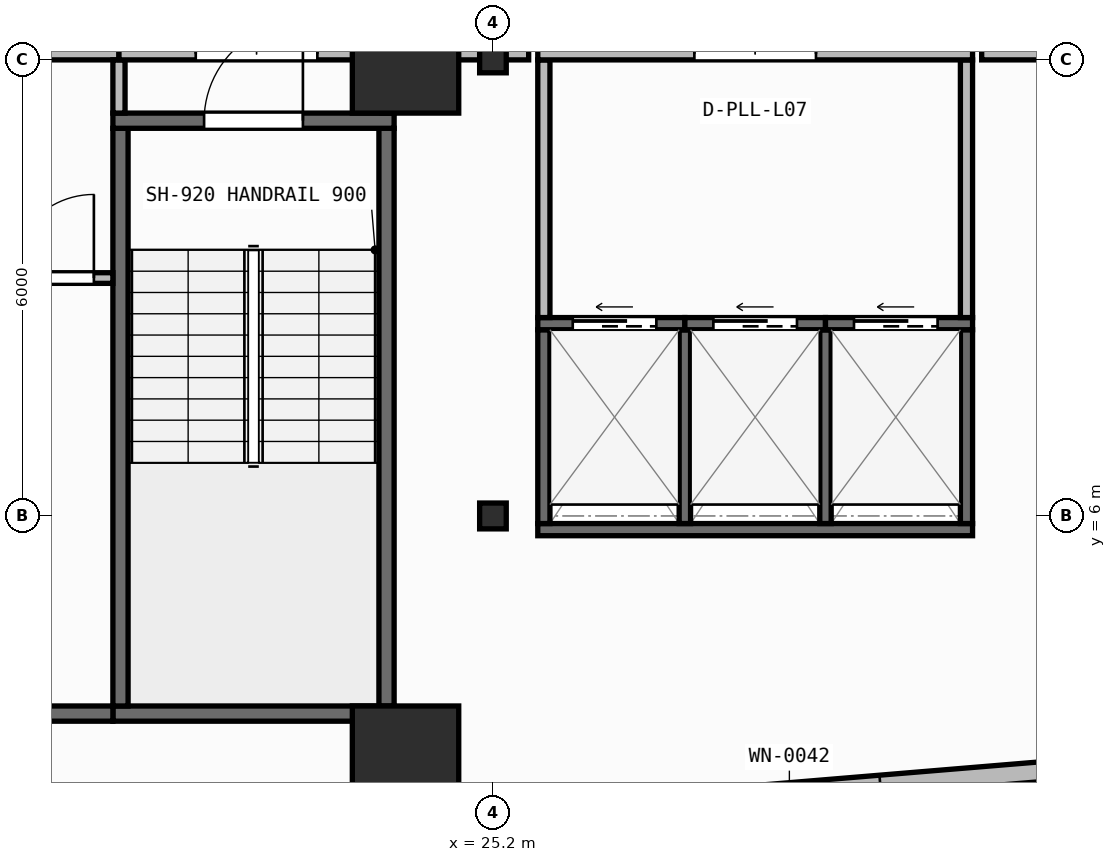
"""IFC4 building model, lengths in metres.
Left out: names, types, materials, properties, quantities, classifications, styles, units other than length and angle.
Written with IfcOpenShell. Run it as: python <this file> out.ifc"""

import sys

from ifc_helpers import new_model, si_unit, direction, frame, frame_2d, origin, origin_2d, place, context, subcontext, project, spatial, rectangle, i_section, extrude, element, fill, save


model = new_model("IFC4")
c1 = context("Model", 3, precision=1e-05, world=origin(), true_north=direction((0.0, 1.0)))
c2 = subcontext(c1, "Body", "Model", "MODEL_VIEW")
j1 = project(units=[si_unit("LENGTHUNIT", "METRE"), si_unit("PLANEANGLEUNIT", "RADIAN")], contexts=[c1])
p1 = place(None, origin())
s1 = spatial("IfcSite", under=j1, at=p1, CompositionType="ELEMENT")
p2 = place(p1, origin())
s2 = spatial("IfcBuilding", under=s1, at=p2, CompositionType="ELEMENT")
p3 = place(p2, frame((0.0, 0.0, 30.4)))
s3 = spatial("IfcBuildingStorey", under=s2, at=p3, CompositionType="ELEMENT", Elevation=30.4)
p4 = place(p3, frame((24.05, 2.8, 0.0), z_axis=(0.0, 0.0, 1.0), x_axis=(1.0, 0.0, 0.0)))
e1 = element("IfcColumn", 1, at=p4, inside=s3, PredefinedType="COLUMN", context=c2, shape_type="SweptSolid", body=[
    extrude(rectangle(XDim=1.4, YDim=1.4, at=origin_2d()), origin(), (0.0, 0.0, 1.0), 3.95),
])
p5 = place(p3, frame((25.2, 6.0, 0.0), z_axis=(0.0, 0.0, 1.0), x_axis=(1.0, 0.0, 0.0)))
e2 = element("IfcColumn", 2, at=p5, inside=s3, PredefinedType="COLUMN", context=c2, shape_type="SweptSolid", body=[
    extrude(i_section(OverallWidth=0.35, OverallDepth=0.34, WebThickness=0.016, FlangeThickness=0.028, at=origin_2d()), origin(), (0.0, 0.0, 1.0), 3.95),
])
p6 = place(p3, frame((24.05, 12.0, 0.0), z_axis=(0.0, 0.0, 1.0), x_axis=(1.0, 0.0, 0.0)))
e3 = element("IfcColumn", 3, at=p6, inside=s3, PredefinedType="COLUMN", context=c2, shape_type="SweptSolid", body=[
    extrude(rectangle(XDim=1.4, YDim=1.4, at=origin_2d()), origin(), (0.0, 0.0, 1.0), 3.95),
])
p7 = place(p3, frame((25.2, 12.0, 0.0), z_axis=(0.0, 0.0, 1.0), x_axis=(1.0, 0.0, 0.0)))
e4 = element("IfcColumn", 4, at=p7, inside=s3, PredefinedType="COLUMN", context=c2, shape_type="SweptSolid", body=[
    extrude(i_section(OverallWidth=0.35, OverallDepth=0.34, WebThickness=0.016, FlangeThickness=0.028, at=origin_2d()), origin(), (0.0, 0.0, 1.0), 3.95),
])
p8 = place(p3, frame((2.76, 0.174, 0.0), z_axis=(0.0, 0.0, 1.0), x_axis=(0.996571478456, 0.082736257641, 0.0)))
e5 = element("IfcWall", 5, at=p8, inside=s3, PredefinedType="STANDARD", context=c2, shape_type="SweptSolid", body=[
    extrude(rectangle(XDim=52.861, YDim=0.26, at=frame_2d((26.431, 0.0))), origin(), (0.0, 0.0, 1.0), 3.71),
])
p9 = place(p8, frame((25.231, 0.0, 0.9)))
e6 = element("IfcOpeningElement", 6, at=p9, cuts=e5, PredefinedType="OPENING", context=c2, shape_type="SweptSolid", body=[
    extrude(rectangle(XDim=2.4, YDim=1.65, at=frame_2d((1.2, 0.825))), frame((0.0, 0.14, 0.0), z_axis=(0.0, -1.0, 0.0), x_axis=(1.0, 0.0, 0.0)), (0.0, 0.0, 1.0), 0.28),
])
p10 = place(p3, frame((20.2, 3.4, 0.0), z_axis=(0.0, 0.0, 1.0), x_axis=(1.0, 0.0, 0.0)))
e7 = element("IfcWall", 7, at=p10, inside=s3, PredefinedType="SHEAR", context=c2, shape_type="SweptSolid", body=[
    extrude(rectangle(XDim=3.7, YDim=0.2, at=frame_2d((1.85, 0.0))), origin(), (0.0, 0.0, 1.0), 3.71),
])
for number, where, z_axis, x_axis in (
    (8, (20.3, 3.5, 0.0), (0.0, 0.0, 1.0), (0.0, 1.0, 0.0)),
    (9, (23.8, 3.5, 0.0), (0.0, 0.0, 1.0), (0.0, 1.0, 0.0)),
):
    element("IfcWall", number, at=place(p3, frame(where, z_axis=z_axis, x_axis=x_axis)), inside=s3, PredefinedType="SHEAR", context=c2, shape_type="SweptSolid", body=[
        extrude(rectangle(XDim=7.6, YDim=0.2, at=frame_2d((3.8, 0.0))), origin(), (0.0, 0.0, 1.0), 3.71),
    ])
p11 = place(p3, frame((20.2, 11.2, 0.0), z_axis=(0.0, 0.0, 1.0), x_axis=(1.0, 0.0, 0.0)))
e10 = element("IfcWall", 10, at=p11, inside=s3, PredefinedType="SHEAR", context=c2, shape_type="SweptSolid", body=[
    extrude(rectangle(XDim=3.7, YDim=0.2, at=frame_2d((1.85, 0.0))), origin(), (0.0, 0.0, 1.0), 3.71),
])
p12 = place(p11, frame((1.2, 0.0, 0.0)))
e11 = element("IfcOpeningElement", 11, at=p12, cuts=e10, PredefinedType="OPENING", context=c2, shape_type="SweptSolid", body=[
    extrude(rectangle(XDim=1.3, YDim=2.15, at=frame_2d((0.65, 1.075))), frame((0.0, 0.11, 0.0), z_axis=(0.0, -1.0, 0.0), x_axis=(1.0, 0.0, 0.0)), (0.0, 0.0, 1.0), 0.22),
])
p13 = place(p3, frame((6.5, 3.4, 0.0), z_axis=(0.0, 0.0, 1.0), x_axis=(1.0, 0.0, 0.0)))
e12 = element("IfcWall", 12, at=p13, inside=s3, PredefinedType="SHEAR", context=c2, shape_type="SweptSolid", body=[
    extrude(rectangle(XDim=13.7, YDim=0.2, at=frame_2d((6.85, 0.0))), origin(), (0.0, 0.0, 1.0), 3.71),
])
p14 = place(p3, frame((25.79, 5.82, 0.0), z_axis=(0.0, 0.0, 1.0), x_axis=(1.0, 0.0, 0.0)))
e13 = element("IfcWall", 13, at=p14, inside=s3, PredefinedType="SHEAR", context=c2, shape_type="SweptSolid", body=[
    extrude(rectangle(XDim=5.72, YDim=0.16, at=frame_2d((2.86, 0.0))), origin(), (0.0, 0.0, 1.0), 3.71),
])
for number, where, z_axis, x_axis in (
    (14, (25.87, 5.9, 0.0), (0.0, 0.0, 1.0), (0.0, 1.0, 0.0)),
    (15, (31.43, 5.9, 0.0), (0.0, 0.0, 1.0), (0.0, 1.0, 0.0)),
):
    element("IfcWall", number, at=place(p3, frame(where, z_axis=z_axis, x_axis=x_axis)), inside=s3, PredefinedType="SHEAR", context=c2, shape_type="SweptSolid", body=[
        extrude(rectangle(XDim=2.55, YDim=0.16, at=frame_2d((1.275, 0.0))), origin(), (0.0, 0.0, 1.0), 3.71),
    ])
for number, where, z_axis, x_axis in (
    (16, (27.725, 5.9, 0.0), (0.0, 0.0, 1.0), (0.0, 1.0, 0.0)),
    (17, (29.575, 5.9, 0.0), (0.0, 0.0, 1.0), (0.0, 1.0, 0.0)),
):
    element("IfcWall", number, at=place(p3, frame(where, z_axis=z_axis, x_axis=x_axis)), inside=s3, PredefinedType="SHEAR", context=c2, shape_type="SweptSolid", body=[
        extrude(rectangle(XDim=2.55, YDim=0.15, at=frame_2d((1.275, 0.0))), origin(), (0.0, 0.0, 1.0), 3.71),
    ])
p15 = place(p3, frame((25.79, 8.53, 0.0), z_axis=(0.0, 0.0, 1.0), x_axis=(1.0, 0.0, 0.0)))
e18 = element("IfcWall", 18, at=p15, inside=s3, PredefinedType="SHEAR", context=c2, shape_type="SweptSolid", body=[
    extrude(rectangle(XDim=1.935, YDim=0.16, at=frame_2d((0.968, 0.0))), origin(), (0.0, 0.0, 1.0), 3.71),
])
p16 = place(p15, frame((0.46, 0.0, 0.0)))
e19 = element("IfcOpeningElement", 19, at=p16, cuts=e18, PredefinedType="OPENING", context=c2, shape_type="SweptSolid", body=[
    extrude(rectangle(XDim=1.1, YDim=2.15, at=frame_2d((0.55, 1.075))), frame((0.0, 0.09, 0.0), z_axis=(0.0, -1.0, 0.0), x_axis=(1.0, 0.0, 0.0)), (0.0, 0.0, 1.0), 0.18),
])
p17 = place(p3, frame((27.725, 8.53, 0.0), z_axis=(0.0, 0.0, 1.0), x_axis=(1.0, 0.0, 0.0)))
e20 = element("IfcWall", 20, at=p17, inside=s3, PredefinedType="SHEAR", context=c2, shape_type="SweptSolid", body=[
    extrude(rectangle(XDim=1.85, YDim=0.16, at=frame_2d((0.925, 0.0))), origin(), (0.0, 0.0, 1.0), 3.71),
])
p18 = place(p17, frame((0.375, 0.0, 0.0)))
e21 = element("IfcOpeningElement", 21, at=p18, cuts=e20, PredefinedType="OPENING", context=c2, shape_type="SweptSolid", body=[
    extrude(rectangle(XDim=1.1, YDim=2.15, at=frame_2d((0.55, 1.075))), frame((0.0, 0.09, 0.0), z_axis=(0.0, -1.0, 0.0), x_axis=(1.0, 0.0, 0.0)), (0.0, 0.0, 1.0), 0.18),
])
p19 = place(p3, frame((29.575, 8.53, 0.0), z_axis=(0.0, 0.0, 1.0), x_axis=(1.0, 0.0, 0.0)))
e22 = element("IfcWall", 22, at=p19, inside=s3, PredefinedType="SHEAR", context=c2, shape_type="SweptSolid", body=[
    extrude(rectangle(XDim=1.935, YDim=0.16, at=frame_2d((0.968, 0.0))), origin(), (0.0, 0.0, 1.0), 3.71),
])
p20 = place(p19, frame((0.375, 0.0, 0.0)))
e23 = element("IfcOpeningElement", 23, at=p20, cuts=e22, PredefinedType="OPENING", context=c2, shape_type="SweptSolid", body=[
    extrude(rectangle(XDim=1.1, YDim=2.15, at=frame_2d((0.55, 1.075))), frame((0.0, 0.09, 0.0), z_axis=(0.0, -1.0, 0.0), x_axis=(1.0, 0.0, 0.0)), (0.0, 0.0, 1.0), 0.18),
])
p21 = place(p3, frame((18.61, 9.13, 0.0), z_axis=(0.0, 0.0, 1.0), x_axis=(1.0, 0.0, 0.0)))
e24 = element("IfcWall", 24, at=p21, inside=s3, PredefinedType="PARTITIONING", context=c2, shape_type="SweptSolid", body=[
    extrude(rectangle(XDim=1.59, YDim=0.14, at=frame_2d((0.795, 0.0))), origin(), (0.0, 0.0, 1.0), 3.71),
])
p22 = place(p21, frame((0.24, 0.0, 0.0)))
e25 = element("IfcOpeningElement", 25, at=p22, cuts=e24, PredefinedType="OPENING", context=c2, shape_type="SweptSolid", body=[
    extrude(rectangle(XDim=1.1, YDim=2.1, at=frame_2d((0.55, 1.05))), frame((0.0, 0.08, 0.0), z_axis=(0.0, -1.0, 0.0), x_axis=(1.0, 0.0, 0.0)), (0.0, 0.0, 1.0), 0.16),
])
p23 = place(p3, frame((12.58, 12.08, 0.0), z_axis=(0.0, 0.0, 1.0), x_axis=(1.0, 0.0, 0.0)))
e26 = element("IfcWall", 26, at=p23, inside=s3, PredefinedType="PARTITIONING", context=c2, shape_type="SweptSolid", body=[
    extrude(rectangle(XDim=7.7, YDim=0.16, at=frame_2d((3.85, 0.0))), origin(), (0.0, 0.0, 1.0), 3.073),
])
p24 = place(p23, frame((3.05, 0.0, 0.0)))
e27 = element("IfcOpeningElement", 27, at=p24, cuts=e26, PredefinedType="OPENING", context=c2, shape_type="SweptSolid", body=[
    extrude(rectangle(XDim=1.6, YDim=2.05, at=frame_2d((0.8, 1.025))), frame((0.0, 0.09, 0.0), z_axis=(0.0, -1.0, 0.0), x_axis=(1.0, 0.0, 0.0)), (0.0, 0.0, 1.0), 0.18),
])
p25 = place(p3, frame((20.28, 11.3, 0.0), z_axis=(0.0, 0.0, 1.0), x_axis=(0.0, 1.0, 0.0)))
e28 = element("IfcWall", 28, at=p25, inside=s3, PredefinedType="PARTITIONING", context=c2, shape_type="SweptSolid", body=[
    extrude(rectangle(XDim=0.7, YDim=0.16, at=frame_2d((0.35, 0.0))), origin(), (0.0, 0.0, 1.0), 3.71),
])
p26 = place(p3, frame((20.28, 12.08, 0.0), z_axis=(0.0, 0.0, 1.0), x_axis=(1.0, 0.0, 0.0)))
e29 = element("IfcWall", 29, at=p26, inside=s3, PredefinedType="PARTITIONING", context=c2, shape_type="SweptSolid", body=[
    extrude(rectangle(XDim=3.62, YDim=0.16, at=frame_2d((1.81, 0.0))), origin(), (0.0, 0.0, 1.0), 3.073),
])
p27 = place(p26, frame((1.01, 0.0, 0.0)))
e30 = element("IfcOpeningElement", 30, at=p27, cuts=e29, PredefinedType="OPENING", context=c2, shape_type="SweptSolid", body=[
    extrude(rectangle(XDim=1.6, YDim=2.05, at=frame_2d((0.8, 1.025))), frame((0.0, 0.09, 0.0), z_axis=(0.0, -1.0, 0.0), x_axis=(1.0, 0.0, 0.0)), (0.0, 0.0, 1.0), 0.18),
])
p28 = place(p3, frame((23.82, 11.3, 0.0), z_axis=(0.0, 0.0, 1.0), x_axis=(0.0, 1.0, 0.0)))
e31 = element("IfcWall", 31, at=p28, inside=s3, PredefinedType="PARTITIONING", context=c2, shape_type="SweptSolid", body=[
    extrude(rectangle(XDim=0.7, YDim=0.16, at=frame_2d((0.35, 0.0))), origin(), (0.0, 0.0, 1.0), 3.71),
])
for number, where, z_axis, x_axis in (
    (32, (25.87, 8.61, 0.0), (0.0, 0.0, 1.0), (0.0, 1.0, 0.0)),
    (33, (31.43, 8.61, 0.0), (0.0, 0.0, 1.0), (0.0, 1.0, 0.0)),
):
    element("IfcWall", number, at=place(p3, frame(where, z_axis=z_axis, x_axis=x_axis)), inside=s3, PredefinedType="PARTITIONING", context=c2, shape_type="SweptSolid", body=[
        extrude(rectangle(XDim=3.39, YDim=0.16, at=frame_2d((1.695, 0.0))), origin(), (0.0, 0.0, 1.0), 3.71),
    ])
p29 = place(p3, frame((25.79, 12.08, 0.0), z_axis=(0.0, 0.0, 1.0), x_axis=(1.0, 0.0, 0.0)))
e34 = element("IfcWall", 34, at=p29, inside=s3, PredefinedType="PARTITIONING", context=c2, shape_type="SweptSolid", body=[
    extrude(rectangle(XDim=5.72, YDim=0.16, at=frame_2d((2.86, 0.0))), origin(), (0.0, 0.0, 1.0), 3.073),
])
p30 = place(p29, frame((2.06, 0.0, 0.0)))
e35 = element("IfcOpeningElement", 35, at=p30, cuts=e34, PredefinedType="OPENING", context=c2, shape_type="SweptSolid", body=[
    extrude(rectangle(XDim=1.6, YDim=2.05, at=frame_2d((0.8, 1.025))), frame((0.0, 0.09, 0.0), z_axis=(0.0, -1.0, 0.0), x_axis=(1.0, 0.0, 0.0)), (0.0, 0.0, 1.0), 0.18),
])
p31 = place(p3, frame((24.02, 12.08, 0.0), z_axis=(0.0, 0.0, 1.0), x_axis=(1.0, 0.0, 0.0)))
e36 = element("IfcWall", 36, at=p31, inside=s3, PredefinedType="PARTITIONING", context=c2, shape_type="SweptSolid", body=[
    extrude(rectangle(XDim=1.65, YDim=0.16, at=frame_2d((0.825, 0.0))), origin(), (0.0, 0.0, 1.0), 3.073),
])
p32 = place(p3, frame((31.63, 12.08, 0.0), z_axis=(0.0, 0.0, 1.0), x_axis=(1.0, 0.0, 0.0)))
e37 = element("IfcWall", 37, at=p32, inside=s3, PredefinedType="PARTITIONING", context=c2, shape_type="SweptSolid", body=[
    extrude(rectangle(XDim=11.181, YDim=0.16, at=frame_2d((5.59, 0.0))), origin(), (0.0, 0.0, 1.0), 3.073),
])
p33 = place(p12, origin())
e38 = element("IfcDoor", 38, at=p33, inside=s3, OperationType="SINGLE_SWING_RIGHT", PredefinedType="DOOR", context=c2, shape_type="SweptSolid", body=[
    extrude(rectangle(XDim=1.3, YDim=2.15, at=frame_2d((0.65, 1.075))), frame((0.0, 0.025, 0.0), z_axis=(0.0, -1.0, 0.0), x_axis=(1.0, 0.0, 0.0)), (0.0, 0.0, 1.0), 0.05),
])
fill(e11, e38)
p34 = place(p16, origin())
e39 = element("IfcDoor", 39, at=p34, inside=s3, OperationType="SLIDING_TO_LEFT", PredefinedType="DOOR", context=c2, shape_type="SweptSolid", body=[
    extrude(rectangle(XDim=1.1, YDim=2.15, at=frame_2d((0.55, 1.075))), frame((0.0, 0.025, 0.0), z_axis=(0.0, -1.0, 0.0), x_axis=(1.0, 0.0, 0.0)), (0.0, 0.0, 1.0), 0.05),
])
fill(e19, e39)
p35 = place(p18, origin())
e40 = element("IfcDoor", 40, at=p35, inside=s3, OperationType="SLIDING_TO_LEFT", PredefinedType="DOOR", context=c2, shape_type="SweptSolid", body=[
    extrude(rectangle(XDim=1.1, YDim=2.15, at=frame_2d((0.55, 1.075))), frame((0.0, 0.025, 0.0), z_axis=(0.0, -1.0, 0.0), x_axis=(1.0, 0.0, 0.0)), (0.0, 0.0, 1.0), 0.05),
])
fill(e21, e40)
p36 = place(p20, origin())
e41 = element("IfcDoor", 41, at=p36, inside=s3, OperationType="SLIDING_TO_LEFT", PredefinedType="DOOR", context=c2, shape_type="SweptSolid", body=[
    extrude(rectangle(XDim=1.1, YDim=2.15, at=frame_2d((0.55, 1.075))), frame((0.0, 0.025, 0.0), z_axis=(0.0, -1.0, 0.0), x_axis=(1.0, 0.0, 0.0)), (0.0, 0.0, 1.0), 0.05),
])
fill(e23, e41)
p37 = place(p22, origin())
e42 = element("IfcDoor", 42, at=p37, inside=s3, OperationType="SINGLE_SWING_RIGHT", PredefinedType="DOOR", context=c2, shape_type="SweptSolid", body=[
    extrude(rectangle(XDim=1.1, YDim=2.1, at=frame_2d((0.55, 1.05))), frame((0.0, 0.025, 0.0), z_axis=(0.0, -1.0, 0.0), x_axis=(1.0, 0.0, 0.0)), (0.0, 0.0, 1.0), 0.05),
])
fill(e25, e42)
p38 = place(p27, origin())
e43 = element("IfcDoor", 43, at=p38, inside=s3, OperationType="DOUBLE_DOOR_SINGLE_SWING", PredefinedType="DOOR", context=c2, shape_type="SweptSolid", body=[
    extrude(rectangle(XDim=1.6, YDim=2.05, at=frame_2d((0.8, 1.025))), frame((0.0, 0.025, 0.0), z_axis=(0.0, -1.0, 0.0), x_axis=(1.0, 0.0, 0.0)), (0.0, 0.0, 1.0), 0.05),
])
fill(e30, e43)
p39 = place(p30, origin())
e44 = element("IfcDoor", 44, at=p39, inside=s3, OperationType="DOUBLE_DOOR_SINGLE_SWING", PredefinedType="DOOR", context=c2, shape_type="SweptSolid", body=[
    extrude(rectangle(XDim=1.6, YDim=2.05, at=frame_2d((0.8, 1.025))), frame((0.0, 0.025, 0.0), z_axis=(0.0, -1.0, 0.0), x_axis=(1.0, 0.0, 0.0)), (0.0, 0.0, 1.0), 0.05),
])
fill(e35, e44)
save(model, sys.argv[1])
